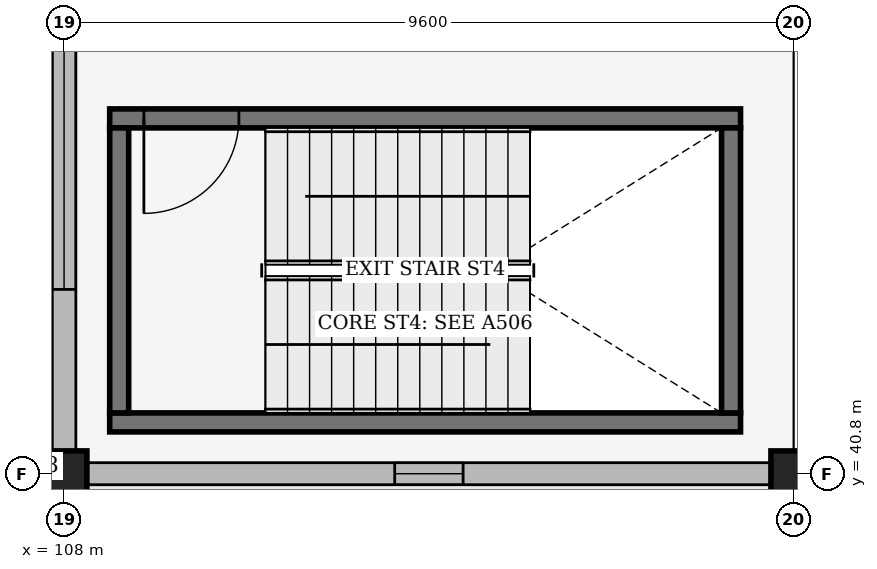
"""IFC4 building model, lengths in metres.
Left out: names, types, materials, properties, quantities, classifications, styles, units other than length and angle.
Written with IfcOpenShell. Run it as: python <this file> out.ifc"""

import sys

from ifc_helpers import new_model, si_unit, direction, frame, frame_2d, origin, origin_2d, place, context, subcontext, project, spatial, rectangle, extrude, element, fill, save


model = new_model("IFC4")
c1 = context("Model", 3, precision=1e-05, world=origin(), true_north=direction((0.0, 1.0)))
c2 = subcontext(c1, "Body", "Model", "MODEL_VIEW")
j1 = project(units=[si_unit("LENGTHUNIT", "METRE"), si_unit("PLANEANGLEUNIT", "RADIAN")], contexts=[c1])
p1 = place(None, origin())
s1 = spatial("IfcSite", under=j1, at=p1, CompositionType="ELEMENT")
p2 = place(p1, origin())
s2 = spatial("IfcBuilding", under=s1, at=p2, CompositionType="ELEMENT")
p3 = place(p2, frame((0.0, 0.0, 10.5)))
s3 = spatial("IfcBuildingStorey", under=s2, at=p3, CompositionType="ELEMENT", Elevation=10.5)
for number, where, z_axis, x_axis in (
    (1, (108.0, 40.8, 0.0), (0.0, 0.0, 1.0), (1.0, 0.0, 0.0)),
    (2, (117.6, 40.8, 0.0), (0.0, 0.0, 1.0), (1.0, 0.0, 0.0)),
):
    element("IfcColumn", number, at=place(p3, frame(where, z_axis=z_axis, x_axis=x_axis)), inside=s3, PredefinedType="COLUMN", context=c2, shape_type="SweptSolid", body=[
        extrude(rectangle(XDim=0.6, YDim=0.6, at=origin_2d()), origin(), (0.0, 0.0, 1.0), 4.8),
    ])
p4 = place(p3, frame((108.0, 48.492, 0.0), z_axis=(0.0, 0.0, 1.0), x_axis=(0.0, -1.0, 0.0)))
e3 = element("IfcWall", 3, at=p4, inside=s3, PredefinedType="SOLIDWALL", context=c2, shape_type="SweptSolid", body=[
    extrude(rectangle(XDim=7.384, YDim=0.31, at=frame_2d((3.692, 0.0))), origin(), (0.0, 0.0, 1.0), 4.146),
])
p5 = place(p4, frame((2.117, 0.0, 0.95)))
e4 = element("IfcOpeningElement", 4, at=p5, cuts=e3, PredefinedType="OPENING", context=c2, shape_type="SweptSolid", body=[
    extrude(rectangle(XDim=3.15, YDim=2.1, at=frame_2d((1.575, 1.05))), frame((0.0, 0.165, 0.0), z_axis=(0.0, -1.0, 0.0), x_axis=(1.0, 0.0, 0.0)), (0.0, 0.0, 1.0), 0.33),
])
p6 = place(p3, frame((108.308, 40.8, 0.0), z_axis=(0.0, 0.0, 1.0), x_axis=(1.0, 0.0, 0.0)))
e5 = element("IfcWall", 5, at=p6, inside=s3, PredefinedType="SOLIDWALL", context=c2, shape_type="SweptSolid", body=[
    extrude(rectangle(XDim=8.984, YDim=0.29, at=frame_2d((4.492, 0.0))), origin(), (0.0, 0.0, 1.0), 3.845),
])
p7 = place(p6, frame((4.042, 0.0, 0.95)))
e6 = element("IfcOpeningElement", 6, at=p7, cuts=e5, PredefinedType="OPENING", context=c2, shape_type="SweptSolid", body=[
    extrude(rectangle(XDim=0.9, YDim=1.2, at=frame_2d((0.45, 0.6))), frame((0.0, 0.155, 0.0), z_axis=(0.0, -1.0, 0.0), x_axis=(1.0, 0.0, 0.0)), (0.0, 0.0, 1.0), 0.31),
])
p8 = place(p3, frame((108.6, 41.475, 0.0), z_axis=(0.0, 0.0, 1.0), x_axis=(1.0, 0.0, 0.0)))
e7 = element("IfcWall", 7, at=p8, inside=s3, PredefinedType="SHEAR", context=c2, shape_type="SweptSolid", body=[
    extrude(rectangle(XDim=8.3, YDim=0.25, at=frame_2d((4.15, 0.0))), origin(), (0.0, 0.0, 1.0), 4.49),
])
p9 = place(p3, frame((116.9, 45.475, 0.0), z_axis=(0.0, 0.0, 1.0), x_axis=(-1.0, 0.0, 0.0)))
e8 = element("IfcWall", 8, at=p9, inside=s3, PredefinedType="SHEAR", context=c2, shape_type="SweptSolid", body=[
    extrude(rectangle(XDim=8.3, YDim=0.25, at=frame_2d((4.15, 0.0))), origin(), (0.0, 0.0, 1.0), 4.49),
])
p10 = place(p9, frame((7.85, 0.0, 0.0), z_axis=(0.0, 0.0, 1.0), x_axis=(-1.0, 0.0, 0.0)))
e9 = element("IfcOpeningElement", 9, at=p10, cuts=e8, PredefinedType="OPENING", context=c2, shape_type="SweptSolid", body=[
    extrude(rectangle(XDim=1.25, YDim=2.2, at=frame_2d((0.625, 1.1))), frame((0.0, 0.135, 0.0), z_axis=(0.0, -1.0, 0.0), x_axis=(1.0, 0.0, 0.0)), (0.0, 0.0, 1.0), 0.27),
])
for number, where, z_axis, x_axis in (
    (10, (108.725, 45.35, 0.0), (0.0, 0.0, 1.0), (0.0, -1.0, 0.0)),
    (11, (116.775, 41.6, 0.0), (0.0, 0.0, 1.0), (0.0, 1.0, 0.0)),
):
    element("IfcWall", number, at=place(p3, frame(where, z_axis=z_axis, x_axis=x_axis)), inside=s3, PredefinedType="SHEAR", context=c2, shape_type="SweptSolid", body=[
        extrude(rectangle(XDim=3.75, YDim=0.25, at=frame_2d((1.875, 0.0))), origin(), (0.0, 0.0, 1.0), 4.49),
    ])
p11 = place(p5, origin())
e12 = element("IfcWindow", 12, at=p11, inside=s3, PartitioningType="SINGLE_PANEL", PredefinedType="WINDOW", context=c2, shape_type="SweptSolid", body=[
    extrude(rectangle(XDim=3.15, YDim=2.1, at=frame_2d((1.575, 1.05))), frame((0.0, 0.03, 0.0), z_axis=(0.0, -1.0, 0.0), x_axis=(1.0, 0.0, 0.0)), (0.0, 0.0, 1.0), 0.06),
])
fill(e4, e12)
p12 = place(p7, origin())
e13 = element("IfcWindow", 13, at=p12, inside=s3, PartitioningType="SINGLE_PANEL", PredefinedType="WINDOW", context=c2, shape_type="SweptSolid", body=[
    extrude(rectangle(XDim=0.9, YDim=1.2, at=frame_2d((0.45, 0.6))), frame((0.0, 0.03, 0.0), z_axis=(0.0, -1.0, 0.0), x_axis=(1.0, 0.0, 0.0)), (0.0, 0.0, 1.0), 0.06),
])
fill(e6, e13)
p13 = place(p10, origin())
e14 = element("IfcDoor", 14, at=p13, inside=s3, OperationType="SINGLE_SWING_LEFT", PredefinedType="DOOR", context=c2, shape_type="SweptSolid", body=[
    extrude(rectangle(XDim=1.25, YDim=2.2, at=frame_2d((0.625, 1.1))), frame((0.0, 0.025, 0.0), z_axis=(0.0, -1.0, 0.0), x_axis=(1.0, 0.0, 0.0)), (0.0, 0.0, 1.0), 0.05),
])
fill(e9, e14)
save(model, sys.argv[1])
